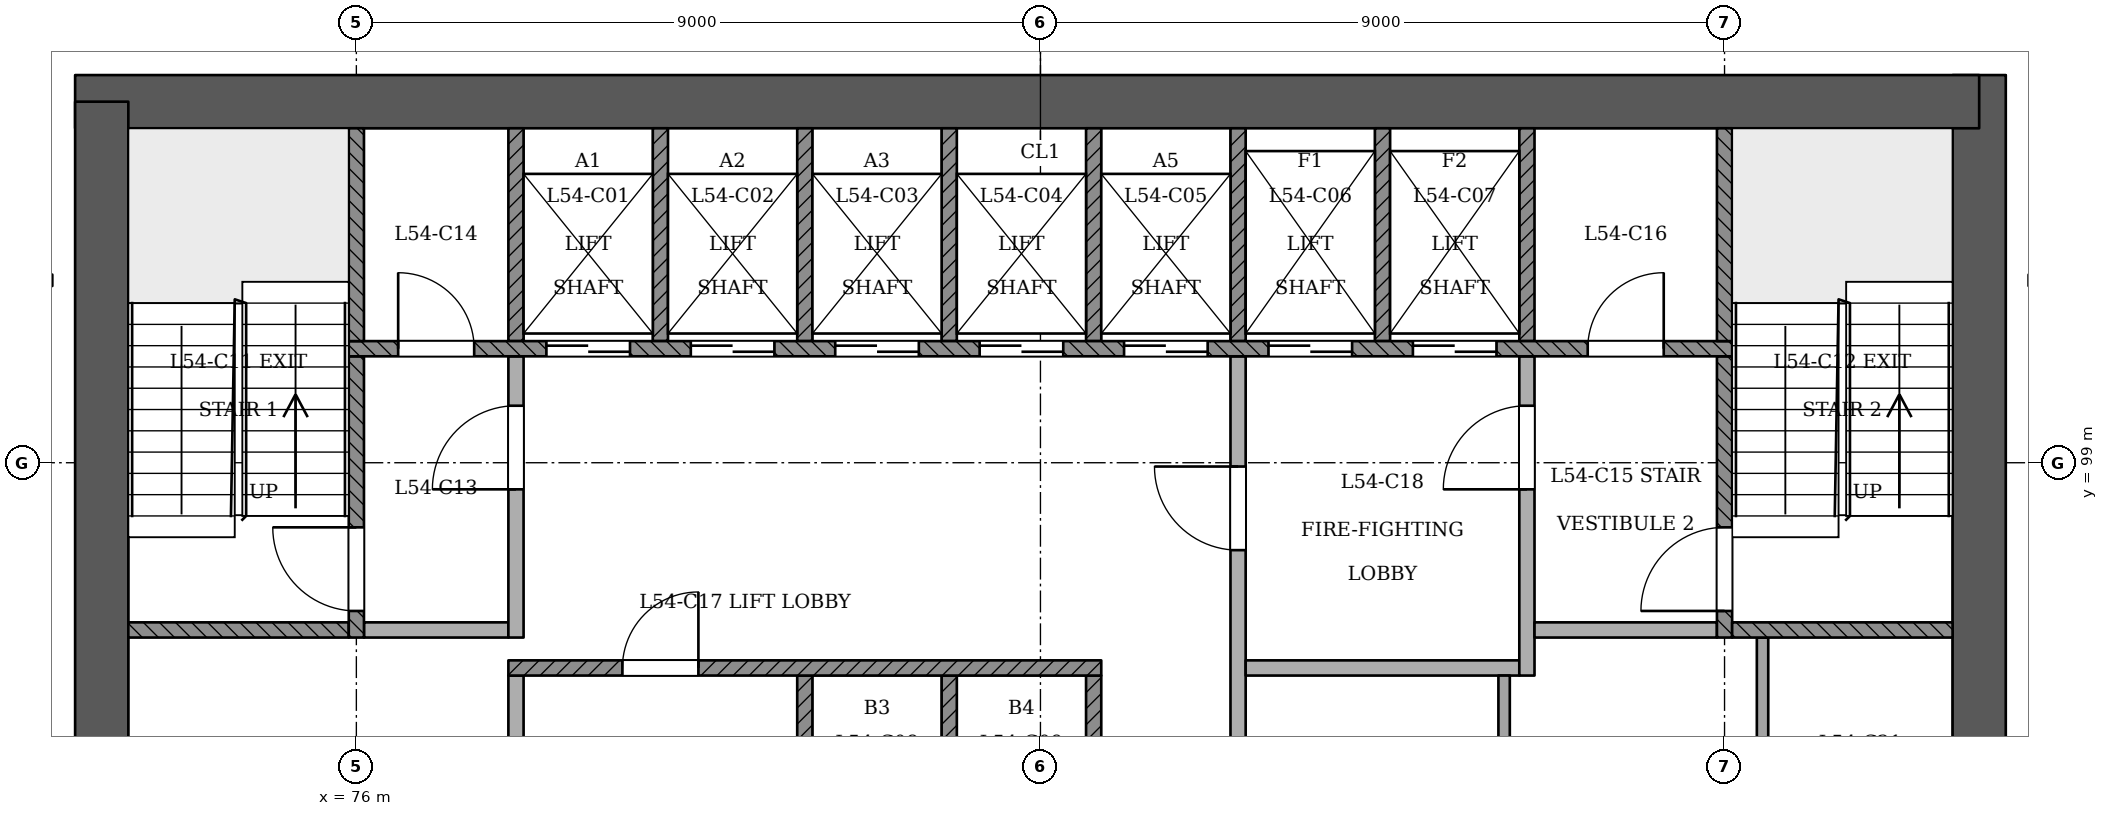
"""IFC4 building model, lengths in metres.
Left out: names, types, materials, properties, quantities, classifications, styles, units other than length and angle.
Written with IfcOpenShell. Run it as: python <this file> out.ifc"""

import sys

from ifc_helpers import new_model, si_unit, direction, frame, frame_2d, origin, place, context, subcontext, project, spatial, rectangle, extrude, element, fill, save


model = new_model("IFC4")
c1 = context("Model", 3, precision=1e-05, world=origin(), true_north=direction((0.0, 1.0)))
c2 = subcontext(c1, "Body", "Model", "MODEL_VIEW")
j1 = project(units=[si_unit("LENGTHUNIT", "METRE"), si_unit("PLANEANGLEUNIT", "RADIAN")], contexts=[c1])
p1 = place(None, origin())
s1 = spatial("IfcSite", under=j1, at=p1, CompositionType="ELEMENT")
p2 = place(p1, origin())
s2 = spatial("IfcBuilding", under=s1, at=p2, CompositionType="ELEMENT")
p3 = place(p2, frame((0.0, 0.0, 208.8)))
s3 = spatial("IfcBuildingStorey", under=s2, at=p3, CompositionType="ELEMENT", Elevation=208.8)
p4 = place(p3, frame((97.35, 93.05, 0.0), z_axis=(0.0, 0.0, 1.0), x_axis=(0.0, 1.0, 0.0)))
e1 = element("IfcWall", 1, at=p4, inside=s3, PredefinedType="SHEAR", context=c2, shape_type="SweptSolid", body=[
    extrude(rectangle(XDim=11.05, YDim=0.7, at=frame_2d((5.525, 0.0))), origin(), (0.0, 0.0, 1.0), 3.6),
])
p5 = place(p3, frame((97.35, 103.75, 0.0), z_axis=(0.0, 0.0, 1.0), x_axis=(-1.0, 0.0, 0.0)))
e2 = element("IfcWall", 2, at=p5, inside=s3, PredefinedType="SHEAR", context=c2, shape_type="SweptSolid", body=[
    extrude(rectangle(XDim=25.05, YDim=0.7, at=frame_2d((12.525, 0.0))), origin(), (0.0, 0.0, 1.0), 3.6),
])
p6 = place(p3, frame((72.65, 103.75, 0.0), z_axis=(0.0, 0.0, 1.0), x_axis=(0.0, -1.0, 0.0)))
e3 = element("IfcWall", 3, at=p6, inside=s3, PredefinedType="SHEAR", context=c2, shape_type="SweptSolid", body=[
    extrude(rectangle(XDim=11.05, YDim=0.7, at=frame_2d((5.525, 0.0))), origin(), (0.0, 0.0, 1.0), 3.6),
])
p7 = place(p3, frame((72.0, 101.4, 0.0), z_axis=(0.0, 0.0, 1.0), x_axis=(-1.0, 0.0, 0.0)))
e4 = element("IfcWall", 4, at=p7, inside=s3, PredefinedType="PARTITIONING", context=c2, shape_type="SweptSolid", body=[
    extrude(rectangle(XDim=1.8, YDim=0.15, at=frame_2d((0.9, 0.0))), origin(), (0.0, 0.0, 1.0), 3.3),
])
p8 = place(p3, frame((78.1, 93.4, 0.0), z_axis=(0.0, 0.0, 1.0), x_axis=(0.0, 1.0, 0.0)))
e5 = element("IfcWall", 5, at=p8, inside=s3, PredefinedType="PARTITIONING", context=c2, shape_type="SweptSolid", body=[
    extrude(rectangle(XDim=2.8, YDim=0.2, at=frame_2d((1.4, 0.0))), origin(), (0.0, 0.0, 1.0), 3.3),
])
for number, where, z_axis, x_axis in (
    (6, (81.9, 93.4, 0.0), (0.0, 0.0, 1.0), (0.0, 1.0, 0.0)),
    (7, (83.8, 93.4, 0.0), (0.0, 0.0, 1.0), (0.0, 1.0, 0.0)),
    (8, (85.7, 93.4, 0.0), (0.0, 0.0, 1.0), (0.0, 1.0, 0.0)),
):
    element("IfcWall", number, at=place(p3, frame(where, z_axis=z_axis, x_axis=x_axis)), inside=s3, PredefinedType="SOLIDWALL", context=c2, shape_type="SweptSolid", body=[
        extrude(rectangle(XDim=2.8, YDim=0.2, at=frame_2d((1.4, 0.0))), origin(), (0.0, 0.0, 1.0), 3.3),
    ])
p9 = place(p3, frame((87.6, 93.4, 0.0), z_axis=(0.0, 0.0, 1.0), x_axis=(0.0, 1.0, 0.0)))
e9 = element("IfcWall", 9, at=p9, inside=s3, PredefinedType="PARTITIONING", context=c2, shape_type="SweptSolid", body=[
    extrude(rectangle(XDim=7.0, YDim=0.2, at=frame_2d((3.5, 0.0))), origin(), (0.0, 0.0, 1.0), 3.3),
])
p10 = place(p9, frame((4.45, 0.0, 0.0)))
e10 = element("IfcOpeningElement", 10, at=p10, cuts=e9, PredefinedType="OPENING", context=c2, shape_type="SweptSolid", body=[
    extrude(rectangle(XDim=1.1, YDim=2.1, at=frame_2d((0.55, 1.05))), frame((0.0, 0.11, 0.0), z_axis=(0.0, -1.0, 0.0), x_axis=(1.0, 0.0, 0.0)), (0.0, 0.0, 1.0), 0.221),
])
p11 = place(p3, frame((91.1, 93.4, 0.0), z_axis=(0.0, 0.0, 1.0), x_axis=(0.0, 1.0, 0.0)))
e11 = element("IfcWall", 11, at=p11, inside=s3, PredefinedType="PARTITIONING", context=c2, shape_type="SweptSolid", body=[
    extrude(rectangle(XDim=2.8, YDim=0.15, at=frame_2d((1.4, 0.0))), origin(), (0.0, 0.0, 1.0), 3.3),
])
p12 = place(p3, frame((94.5, 93.4, 0.0), z_axis=(0.0, 0.0, 1.0), x_axis=(0.0, 1.0, 0.0)))
e12 = element("IfcWall", 12, at=p12, inside=s3, PredefinedType="PARTITIONING", context=c2, shape_type="SweptSolid", body=[
    extrude(rectangle(XDim=3.3, YDim=0.15, at=frame_2d((1.65, 0.0))), origin(), (0.0, 0.0, 1.0), 3.3),
])
p13 = place(p3, frame((78.0, 96.3, 0.0), z_axis=(0.0, 0.0, 1.0), x_axis=(1.0, 0.0, 0.0)))
e13 = element("IfcWall", 13, at=p13, inside=s3, PredefinedType="SOLIDWALL", context=c2, shape_type="SweptSolid", body=[
    extrude(rectangle(XDim=7.8, YDim=0.2, at=frame_2d((3.9, 0.0))), origin(), (0.0, 0.0, 1.0), 3.3),
])
p14 = place(p13, frame((1.5, 0.0, 0.0)))
e14 = element("IfcOpeningElement", 14, at=p14, cuts=e13, PredefinedType="OPENING", context=c2, shape_type="SweptSolid", body=[
    extrude(rectangle(XDim=1.0, YDim=2.1, at=frame_2d((0.5, 1.05))), frame((0.0, 0.11, 0.0), z_axis=(0.0, -1.0, 0.0), x_axis=(1.0, 0.0, 0.0)), (0.0, 0.0, 1.0), 0.221),
])
p15 = place(p3, frame((87.7, 96.3, 0.0), z_axis=(0.0, 0.0, 1.0), x_axis=(1.0, 0.0, 0.0)))
e15 = element("IfcWall", 15, at=p15, inside=s3, PredefinedType="PARTITIONING", context=c2, shape_type="SweptSolid", body=[
    extrude(rectangle(XDim=3.6, YDim=0.2, at=frame_2d((1.8, 0.0))), origin(), (0.0, 0.0, 1.0), 3.3),
])
p16 = place(p3, frame((91.4, 96.2, 0.0), z_axis=(0.0, 0.0, 1.0), x_axis=(0.0, 1.0, 0.0)))
e16 = element("IfcWall", 16, at=p16, inside=s3, PredefinedType="PARTITIONING", context=c2, shape_type="SweptSolid", body=[
    extrude(rectangle(XDim=4.2, YDim=0.2, at=frame_2d((2.1, 0.0))), origin(), (0.0, 0.0, 1.0), 3.3),
])
p17 = place(p16, frame((2.45, 0.0, 0.0)))
e17 = element("IfcOpeningElement", 17, at=p17, cuts=e16, PredefinedType="OPENING", context=c2, shape_type="SweptSolid", body=[
    extrude(rectangle(XDim=1.1, YDim=2.1, at=frame_2d((0.55, 1.05))), frame((0.0, 0.11, 0.0), z_axis=(0.0, -1.0, 0.0), x_axis=(1.0, 0.0, 0.0)), (0.0, 0.0, 1.0), 0.221),
])
p18 = place(p3, frame((73.0, 96.8, 0.0), z_axis=(0.0, 0.0, 1.0), x_axis=(1.0, 0.0, 0.0)))
e18 = element("IfcWall", 18, at=p18, inside=s3, PredefinedType="SOLIDWALL", context=c2, shape_type="SweptSolid", body=[
    extrude(rectangle(XDim=2.9, YDim=0.2, at=frame_2d((1.45, 0.0))), origin(), (0.0, 0.0, 1.0), 3.3),
])
p19 = place(p3, frame((76.0, 96.7, 0.0), z_axis=(0.0, 0.0, 1.0), x_axis=(0.0, 1.0, 0.0)))
e19 = element("IfcWall", 19, at=p19, inside=s3, PredefinedType="SOLIDWALL", context=c2, shape_type="SweptSolid", body=[
    extrude(rectangle(XDim=3.7, YDim=0.2, at=frame_2d((1.85, 0.0))), origin(), (0.0, 0.0, 1.0), 3.3),
])
p20 = place(p19, frame((0.35, 0.0, 0.0)))
e20 = element("IfcOpeningElement", 20, at=p20, cuts=e19, PredefinedType="OPENING", context=c2, shape_type="SweptSolid", body=[
    extrude(rectangle(XDim=1.1, YDim=2.1, at=frame_2d((0.55, 1.05))), frame((0.0, 0.11, 0.0), z_axis=(0.0, -1.0, 0.0), x_axis=(1.0, 0.0, 0.0)), (0.0, 0.0, 1.0), 0.221),
])
p21 = place(p3, frame((76.1, 96.8, 0.0), z_axis=(0.0, 0.0, 1.0), x_axis=(1.0, 0.0, 0.0)))
e21 = element("IfcWall", 21, at=p21, inside=s3, PredefinedType="PARTITIONING", context=c2, shape_type="SweptSolid", body=[
    extrude(rectangle(XDim=1.9, YDim=0.2, at=frame_2d((0.95, 0.0))), origin(), (0.0, 0.0, 1.0), 3.3),
])
p22 = place(p3, frame((78.1, 96.7, 0.0), z_axis=(0.0, 0.0, 1.0), x_axis=(0.0, 1.0, 0.0)))
e22 = element("IfcWall", 22, at=p22, inside=s3, PredefinedType="PARTITIONING", context=c2, shape_type="SweptSolid", body=[
    extrude(rectangle(XDim=3.7, YDim=0.2, at=frame_2d((1.85, 0.0))), origin(), (0.0, 0.0, 1.0), 3.3),
])
p23 = place(p22, frame((1.95, 0.0, 0.0)))
e23 = element("IfcOpeningElement", 23, at=p23, cuts=e22, PredefinedType="OPENING", context=c2, shape_type="SweptSolid", body=[
    extrude(rectangle(XDim=1.1, YDim=2.1, at=frame_2d((0.55, 1.05))), frame((0.0, 0.11, 0.0), z_axis=(0.0, -1.0, 0.0), x_axis=(1.0, 0.0, 0.0)), (0.0, 0.0, 1.0), 0.221),
])
p24 = place(p3, frame((91.5, 96.8, 0.0), z_axis=(0.0, 0.0, 1.0), x_axis=(1.0, 0.0, 0.0)))
e24 = element("IfcWall", 24, at=p24, inside=s3, PredefinedType="PARTITIONING", context=c2, shape_type="SweptSolid", body=[
    extrude(rectangle(XDim=2.4, YDim=0.2, at=frame_2d((1.2, 0.0))), origin(), (0.0, 0.0, 1.0), 3.3),
])
p25 = place(p3, frame((94.0, 96.7, 0.0), z_axis=(0.0, 0.0, 1.0), x_axis=(0.0, 1.0, 0.0)))
e25 = element("IfcWall", 25, at=p25, inside=s3, PredefinedType="SOLIDWALL", context=c2, shape_type="SweptSolid", body=[
    extrude(rectangle(XDim=3.7, YDim=0.2, at=frame_2d((1.85, 0.0))), origin(), (0.0, 0.0, 1.0), 3.3),
])
p26 = place(p25, frame((0.35, 0.0, 0.0)))
e26 = element("IfcOpeningElement", 26, at=p26, cuts=e25, PredefinedType="OPENING", context=c2, shape_type="SweptSolid", body=[
    extrude(rectangle(XDim=1.1, YDim=2.1, at=frame_2d((0.55, 1.05))), frame((0.0, 0.11, 0.0), z_axis=(0.0, -1.0, 0.0), x_axis=(1.0, 0.0, 0.0)), (0.0, 0.0, 1.0), 0.221),
])
p27 = place(p3, frame((94.1, 96.8, 0.0), z_axis=(0.0, 0.0, 1.0), x_axis=(1.0, 0.0, 0.0)))
e27 = element("IfcWall", 27, at=p27, inside=s3, PredefinedType="SOLIDWALL", context=c2, shape_type="SweptSolid", body=[
    extrude(rectangle(XDim=2.9, YDim=0.2, at=frame_2d((1.45, 0.0))), origin(), (0.0, 0.0, 1.0), 3.3),
])
p28 = place(p3, frame((75.9, 100.5, 0.0), z_axis=(0.0, 0.0, 1.0), x_axis=(1.0, 0.0, 0.0)))
e28 = element("IfcWall", 28, at=p28, inside=s3, PredefinedType="SOLIDWALL", context=c2, shape_type="SweptSolid", body=[
    extrude(rectangle(XDim=18.2, YDim=0.2, at=frame_2d((9.1, 0.0))), origin(), (0.0, 0.0, 1.0), 3.3),
])
p29 = place(p28, frame((2.6, 0.0, 0.0)))
e29 = element("IfcOpeningElement", 29, at=p29, cuts=e28, PredefinedType="OPENING", context=c2, shape_type="SweptSolid", body=[
    extrude(rectangle(XDim=1.1, YDim=2.1, at=frame_2d((0.55, 1.05))), frame((0.0, 0.11, 0.0), z_axis=(0.0, -1.0, 0.0), x_axis=(1.0, 0.0, 0.0)), (0.0, 0.0, 1.0), 0.221),
])
p30 = place(p28, frame((4.5, 0.0, 0.0)))
e30 = element("IfcOpeningElement", 30, at=p30, cuts=e28, PredefinedType="OPENING", context=c2, shape_type="SweptSolid", body=[
    extrude(rectangle(XDim=1.1, YDim=2.1, at=frame_2d((0.55, 1.05))), frame((0.0, 0.11, 0.0), z_axis=(0.0, -1.0, 0.0), x_axis=(1.0, 0.0, 0.0)), (0.0, 0.0, 1.0), 0.221),
])
p31 = place(p28, frame((6.4, 0.0, 0.0)))
e31 = element("IfcOpeningElement", 31, at=p31, cuts=e28, PredefinedType="OPENING", context=c2, shape_type="SweptSolid", body=[
    extrude(rectangle(XDim=1.1, YDim=2.1, at=frame_2d((0.55, 1.05))), frame((0.0, 0.11, 0.0), z_axis=(0.0, -1.0, 0.0), x_axis=(1.0, 0.0, 0.0)), (0.0, 0.0, 1.0), 0.221),
])
p32 = place(p28, frame((8.3, 0.0, 0.0)))
e32 = element("IfcOpeningElement", 32, at=p32, cuts=e28, PredefinedType="OPENING", context=c2, shape_type="SweptSolid", body=[
    extrude(rectangle(XDim=1.1, YDim=2.1, at=frame_2d((0.55, 1.05))), frame((0.0, 0.11, 0.0), z_axis=(0.0, -1.0, 0.0), x_axis=(1.0, 0.0, 0.0)), (0.0, 0.0, 1.0), 0.221),
])
p33 = place(p28, frame((10.2, 0.0, 0.0)))
e33 = element("IfcOpeningElement", 33, at=p33, cuts=e28, PredefinedType="OPENING", context=c2, shape_type="SweptSolid", body=[
    extrude(rectangle(XDim=1.1, YDim=2.1, at=frame_2d((0.55, 1.05))), frame((0.0, 0.11, 0.0), z_axis=(0.0, -1.0, 0.0), x_axis=(1.0, 0.0, 0.0)), (0.0, 0.0, 1.0), 0.221),
])
p34 = place(p28, frame((12.1, 0.0, 0.0)))
e34 = element("IfcOpeningElement", 34, at=p34, cuts=e28, PredefinedType="OPENING", context=c2, shape_type="SweptSolid", body=[
    extrude(rectangle(XDim=1.1, YDim=2.1, at=frame_2d((0.55, 1.05))), frame((0.0, 0.11, 0.0), z_axis=(0.0, -1.0, 0.0), x_axis=(1.0, 0.0, 0.0)), (0.0, 0.0, 1.0), 0.221),
])
p35 = place(p28, frame((14.0, 0.0, 0.0)))
e35 = element("IfcOpeningElement", 35, at=p35, cuts=e28, PredefinedType="OPENING", context=c2, shape_type="SweptSolid", body=[
    extrude(rectangle(XDim=1.1, YDim=2.1, at=frame_2d((0.55, 1.05))), frame((0.0, 0.11, 0.0), z_axis=(0.0, -1.0, 0.0), x_axis=(1.0, 0.0, 0.0)), (0.0, 0.0, 1.0), 0.221),
])
p36 = place(p28, frame((0.65, 0.0, 0.0)))
e36 = element("IfcOpeningElement", 36, at=p36, cuts=e28, PredefinedType="OPENING", context=c2, shape_type="SweptSolid", body=[
    extrude(rectangle(XDim=1.0, YDim=2.1, at=frame_2d((0.5, 1.05))), frame((0.0, 0.11, 0.0), z_axis=(0.0, -1.0, 0.0), x_axis=(1.0, 0.0, 0.0)), (0.0, 0.0, 1.0), 0.221),
])
p37 = place(p28, frame((16.3, 0.0, 0.0)))
e37 = element("IfcOpeningElement", 37, at=p37, cuts=e28, PredefinedType="OPENING", context=c2, shape_type="SweptSolid", body=[
    extrude(rectangle(XDim=1.0, YDim=2.1, at=frame_2d((0.5, 1.05))), frame((0.0, 0.11, 0.0), z_axis=(0.0, -1.0, 0.0), x_axis=(1.0, 0.0, 0.0)), (0.0, 0.0, 1.0), 0.221),
])
for number, where, z_axis, x_axis in (
    (38, (76.0, 100.6, 0.0), (0.0, 0.0, 1.0), (0.0, 1.0, 0.0)),
    (39, (78.1, 100.6, 0.0), (0.0, 0.0, 1.0), (0.0, 1.0, 0.0)),
    (40, (80.0, 100.6, 0.0), (0.0, 0.0, 1.0), (0.0, 1.0, 0.0)),
    (41, (81.9, 100.6, 0.0), (0.0, 0.0, 1.0), (0.0, 1.0, 0.0)),
    (42, (83.8, 100.6, 0.0), (0.0, 0.0, 1.0), (0.0, 1.0, 0.0)),
    (43, (85.7, 100.6, 0.0), (0.0, 0.0, 1.0), (0.0, 1.0, 0.0)),
    (44, (87.6, 100.6, 0.0), (0.0, 0.0, 1.0), (0.0, 1.0, 0.0)),
    (45, (89.5, 100.6, 0.0), (0.0, 0.0, 1.0), (0.0, 1.0, 0.0)),
    (46, (91.4, 100.6, 0.0), (0.0, 0.0, 1.0), (0.0, 1.0, 0.0)),
    (47, (94.0, 100.6, 0.0), (0.0, 0.0, 1.0), (0.0, 1.0, 0.0)),
):
    element("IfcWall", number, at=place(p3, frame(where, z_axis=z_axis, x_axis=x_axis)), inside=s3, PredefinedType="SOLIDWALL", context=c2, shape_type="SweptSolid", body=[
        extrude(rectangle(XDim=2.8, YDim=0.2, at=frame_2d((1.4, 0.0))), origin(), (0.0, 0.0, 1.0), 3.3),
    ])
p38 = place(p29, origin())
e48 = element("IfcDoor", 48, at=p38, inside=s3, OperationType="SLIDING_TO_RIGHT", PredefinedType="NOTDEFINED", context=c2, shape_type="SweptSolid", body=[
    extrude(rectangle(XDim=1.1, YDim=2.1, at=frame_2d((0.55, 1.05))), frame((0.0, 0.025, 0.0), z_axis=(0.0, -1.0, 0.0), x_axis=(1.0, 0.0, 0.0)), (0.0, 0.0, 1.0), 0.05),
])
fill(e29, e48)
p39 = place(p30, origin())
e49 = element("IfcDoor", 49, at=p39, inside=s3, OperationType="SLIDING_TO_LEFT", PredefinedType="NOTDEFINED", context=c2, shape_type="SweptSolid", body=[
    extrude(rectangle(XDim=1.1, YDim=2.1, at=frame_2d((0.55, 1.05))), frame((0.0, 0.025, 0.0), z_axis=(0.0, -1.0, 0.0), x_axis=(1.0, 0.0, 0.0)), (0.0, 0.0, 1.0), 0.05),
])
fill(e30, e49)
p40 = place(p31, origin())
e50 = element("IfcDoor", 50, at=p40, inside=s3, OperationType="SLIDING_TO_RIGHT", PredefinedType="NOTDEFINED", context=c2, shape_type="SweptSolid", body=[
    extrude(rectangle(XDim=1.1, YDim=2.1, at=frame_2d((0.55, 1.05))), frame((0.0, 0.025, 0.0), z_axis=(0.0, -1.0, 0.0), x_axis=(1.0, 0.0, 0.0)), (0.0, 0.0, 1.0), 0.05),
])
fill(e31, e50)
p41 = place(p32, origin())
e51 = element("IfcDoor", 51, at=p41, inside=s3, OperationType="SLIDING_TO_LEFT", PredefinedType="NOTDEFINED", context=c2, shape_type="SweptSolid", body=[
    extrude(rectangle(XDim=1.1, YDim=2.1, at=frame_2d((0.55, 1.05))), frame((0.0, 0.025, 0.0), z_axis=(0.0, -1.0, 0.0), x_axis=(1.0, 0.0, 0.0)), (0.0, 0.0, 1.0), 0.05),
])
fill(e32, e51)
p42 = place(p33, origin())
e52 = element("IfcDoor", 52, at=p42, inside=s3, OperationType="SLIDING_TO_RIGHT", PredefinedType="NOTDEFINED", context=c2, shape_type="SweptSolid", body=[
    extrude(rectangle(XDim=1.1, YDim=2.1, at=frame_2d((0.55, 1.05))), frame((0.0, 0.025, 0.0), z_axis=(0.0, -1.0, 0.0), x_axis=(1.0, 0.0, 0.0)), (0.0, 0.0, 1.0), 0.05),
])
fill(e33, e52)
p43 = place(p34, origin())
e53 = element("IfcDoor", 53, at=p43, inside=s3, OperationType="SLIDING_TO_RIGHT", PredefinedType="NOTDEFINED", context=c2, shape_type="SweptSolid", body=[
    extrude(rectangle(XDim=1.1, YDim=2.1, at=frame_2d((0.55, 1.05))), frame((0.0, 0.025, 0.0), z_axis=(0.0, -1.0, 0.0), x_axis=(1.0, 0.0, 0.0)), (0.0, 0.0, 1.0), 0.05),
])
fill(e34, e53)
p44 = place(p35, origin())
e54 = element("IfcDoor", 54, at=p44, inside=s3, OperationType="SLIDING_TO_LEFT", PredefinedType="NOTDEFINED", context=c2, shape_type="SweptSolid", body=[
    extrude(rectangle(XDim=1.1, YDim=2.1, at=frame_2d((0.55, 1.05))), frame((0.0, 0.025, 0.0), z_axis=(0.0, -1.0, 0.0), x_axis=(1.0, 0.0, 0.0)), (0.0, 0.0, 1.0), 0.05),
])
fill(e35, e54)
p45 = place(p20, origin())
e55 = element("IfcDoor", 55, at=p45, inside=s3, OperationType="SINGLE_SWING_RIGHT", PredefinedType="NOTDEFINED", context=c2, shape_type="SweptSolid", body=[
    extrude(rectangle(XDim=1.1, YDim=2.1, at=frame_2d((0.55, 1.05))), frame((0.0, 0.025, 0.0), z_axis=(0.0, -1.0, 0.0), x_axis=(1.0, 0.0, 0.0)), (0.0, 0.0, 1.0), 0.05),
])
fill(e20, e55)
p46 = place(p26, origin())
e56 = element("IfcDoor", 56, at=p46, inside=s3, OperationType="SINGLE_SWING_LEFT", PredefinedType="NOTDEFINED", context=c2, shape_type="SweptSolid", body=[
    extrude(rectangle(XDim=1.1, YDim=2.1, at=frame_2d((0.55, 1.05))), frame((0.0, 0.025, 0.0), z_axis=(0.0, -1.0, 0.0), x_axis=(1.0, 0.0, 0.0)), (0.0, 0.0, 1.0), 0.05),
])
fill(e26, e56)
p47 = place(p23, origin())
e57 = element("IfcDoor", 57, at=p47, inside=s3, OperationType="SINGLE_SWING_LEFT", PredefinedType="NOTDEFINED", context=c2, shape_type="SweptSolid", body=[
    extrude(rectangle(XDim=1.1, YDim=2.1, at=frame_2d((0.55, 1.05))), frame((0.0, 0.025, 0.0), z_axis=(0.0, -1.0, 0.0), x_axis=(1.0, 0.0, 0.0)), (0.0, 0.0, 1.0), 0.05),
])
fill(e23, e57)
p48 = place(p10, origin())
e58 = element("IfcDoor", 58, at=p48, inside=s3, OperationType="SINGLE_SWING_RIGHT", PredefinedType="NOTDEFINED", context=c2, shape_type="SweptSolid", body=[
    extrude(rectangle(XDim=1.1, YDim=2.1, at=frame_2d((0.55, 1.05))), frame((0.0, 0.025, 0.0), z_axis=(0.0, -1.0, 0.0), x_axis=(1.0, 0.0, 0.0)), (0.0, 0.0, 1.0), 0.05),
])
fill(e10, e58)
p49 = place(p17, origin())
e59 = element("IfcDoor", 59, at=p49, inside=s3, OperationType="SINGLE_SWING_LEFT", PredefinedType="NOTDEFINED", context=c2, shape_type="SweptSolid", body=[
    extrude(rectangle(XDim=1.1, YDim=2.1, at=frame_2d((0.55, 1.05))), frame((0.0, 0.025, 0.0), z_axis=(0.0, -1.0, 0.0), x_axis=(1.0, 0.0, 0.0)), (0.0, 0.0, 1.0), 0.05),
])
fill(e17, e59)
p50 = place(p36, origin())
e60 = element("IfcDoor", 60, at=p50, inside=s3, OperationType="SINGLE_SWING_LEFT", PredefinedType="NOTDEFINED", context=c2, shape_type="SweptSolid", body=[
    extrude(rectangle(XDim=1.0, YDim=2.1, at=frame_2d((0.5, 1.05))), frame((0.0, 0.025, 0.0), z_axis=(0.0, -1.0, 0.0), x_axis=(1.0, 0.0, 0.0)), (0.0, 0.0, 1.0), 0.05),
])
fill(e36, e60)
p51 = place(p37, origin())
e61 = element("IfcDoor", 61, at=p51, inside=s3, OperationType="SINGLE_SWING_RIGHT", PredefinedType="NOTDEFINED", context=c2, shape_type="SweptSolid", body=[
    extrude(rectangle(XDim=1.0, YDim=2.1, at=frame_2d((0.5, 1.05))), frame((0.0, 0.025, 0.0), z_axis=(0.0, -1.0, 0.0), x_axis=(1.0, 0.0, 0.0)), (0.0, 0.0, 1.0), 0.05),
])
fill(e37, e61)
p52 = place(p14, origin())
e62 = element("IfcDoor", 62, at=p52, inside=s3, OperationType="SINGLE_SWING_RIGHT", PredefinedType="NOTDEFINED", context=c2, shape_type="SweptSolid", body=[
    extrude(rectangle(XDim=1.0, YDim=2.1, at=frame_2d((0.5, 1.05))), frame((0.0, 0.025, 0.0), z_axis=(0.0, -1.0, 0.0), x_axis=(1.0, 0.0, 0.0)), (0.0, 0.0, 1.0), 0.05),
])
fill(e14, e62)
save(model, sys.argv[1])
